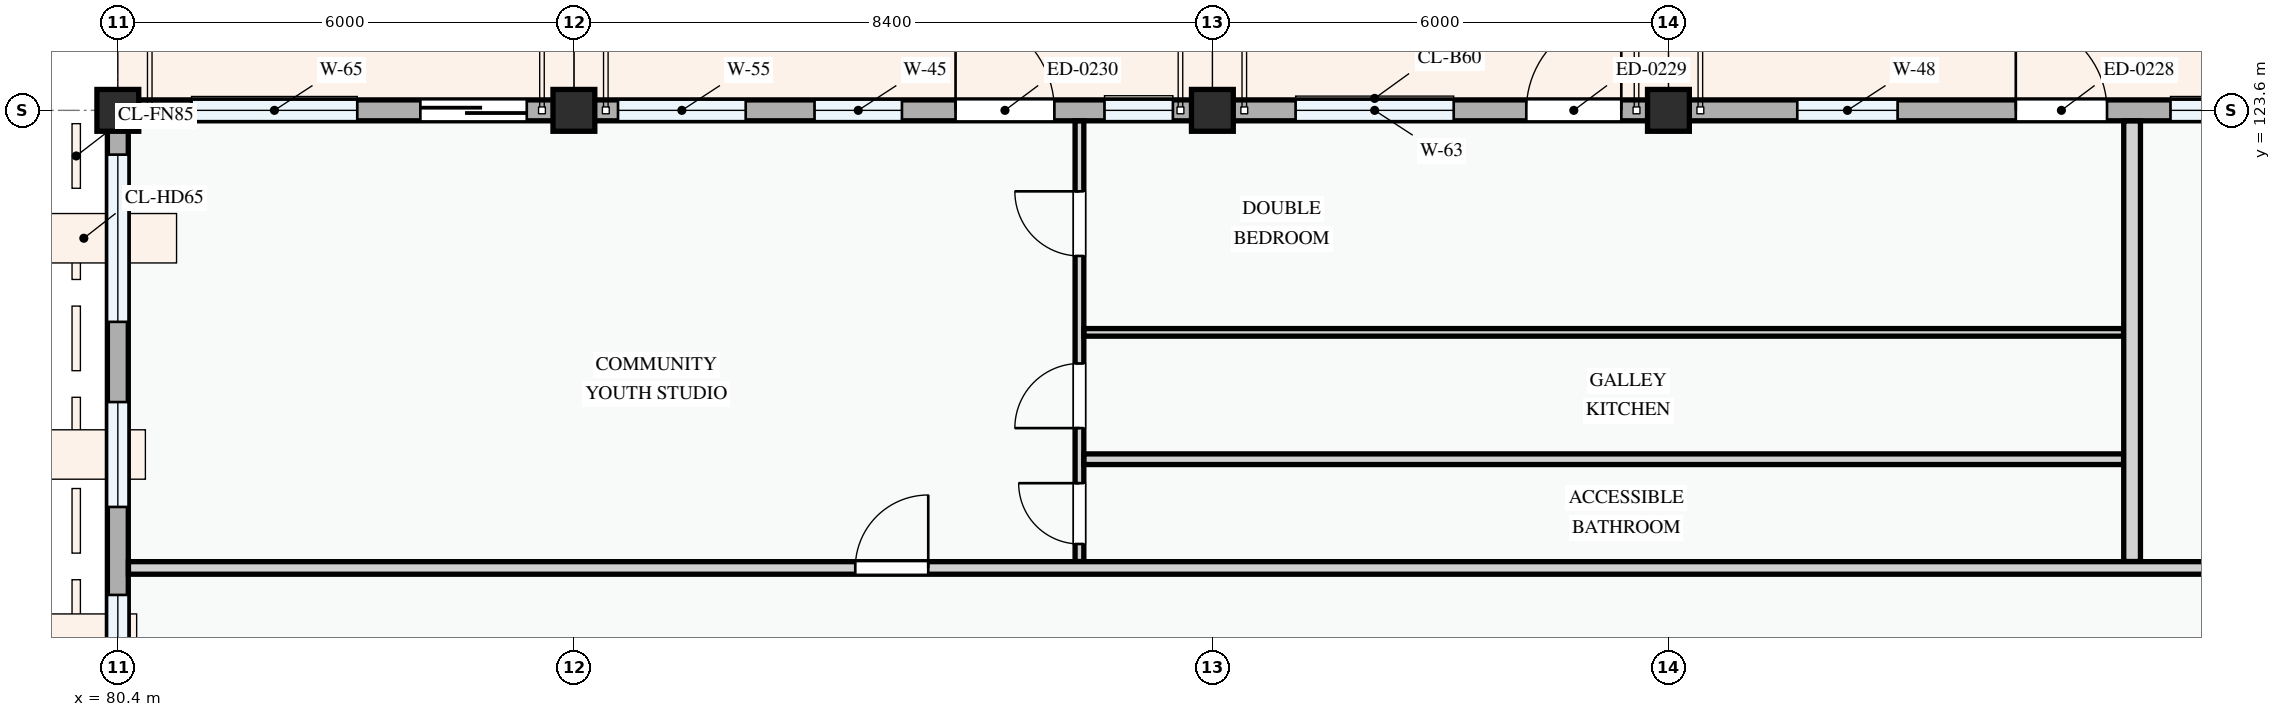
"""IFC4 building model, lengths in metres.
Left out: names, types, materials, properties, quantities, classifications, styles, units other than length and angle.
Written with IfcOpenShell. Run it as: python <this file> out.ifc"""

import sys

from ifc_helpers import new_model, si_unit, direction, frame, frame_2d, origin, origin_2d, place, context, subcontext, project, spatial, rectangle, extrude, element, fill, save


model = new_model("IFC4")
c1 = context("Model", 3, precision=1e-05, world=origin(), true_north=direction((0.0, 1.0)))
c2 = subcontext(c1, "Body", "Model", "MODEL_VIEW")
j1 = project(units=[si_unit("LENGTHUNIT", "METRE"), si_unit("PLANEANGLEUNIT", "RADIAN")], contexts=[c1])
p1 = place(None, origin())
s1 = spatial("IfcSite", under=j1, at=p1, CompositionType="ELEMENT")
p2 = place(p1, origin())
s2 = spatial("IfcBuilding", under=s1, at=p2, CompositionType="ELEMENT")
p3 = place(p2, frame((0.0, 0.0, 27.9)))
s3 = spatial("IfcBuildingStorey", under=s2, at=p3, CompositionType="ELEMENT", Elevation=27.9)
for number, where, z_axis, x_axis in (
    (1, (80.4, 123.6, 0.0), (0.0, 0.0, 1.0), (1.0, 0.0, 0.0)),
    (2, (86.4, 123.6, 0.0), (0.0, 0.0, 1.0), (1.0, 0.0, 0.0)),
    (3, (94.8, 123.6, 0.0), (0.0, 0.0, 1.0), (1.0, 0.0, 0.0)),
    (4, (100.8, 123.6, 0.0), (0.0, 0.0, 1.0), (1.0, 0.0, 0.0)),
):
    element("IfcColumn", number, at=place(p3, frame(where, z_axis=z_axis, x_axis=x_axis)), inside=s3, PredefinedType="COLUMN", context=c2, shape_type="SweptSolid", body=[
        extrude(rectangle(XDim=0.55, YDim=0.55, at=origin_2d()), origin(), (0.0, 0.0, 1.0), 3.3),
    ])
p4 = place(p3, frame((109.2, 123.6, 0.0), z_axis=(0.0, 0.0, 1.0), x_axis=(-1.0, 0.0, 0.0)))
e5 = element("IfcWall", 5, at=p4, inside=s3, PredefinedType="STANDARD", context=c2, shape_type="SweptSolid", body=[
    extrude(rectangle(XDim=8.4, YDim=0.275, at=frame_2d((4.2, 0.0))), origin(), (0.0, 0.0, 1.0), 2.345),
])
p5 = place(p4, frame((2.63, 0.0, 0.0)))
e6 = element("IfcOpeningElement", 6, at=p5, cuts=e5, PredefinedType="OPENING", context=c2, shape_type="SweptSolid", body=[
    extrude(rectangle(XDim=1.2, YDim=2.15, at=frame_2d((0.6, 1.075))), frame((0.0, 0.147, 0.0), z_axis=(0.0, -1.0, 0.0), x_axis=(1.0, 0.0, 0.0)), (0.0, 0.0, 1.0), 0.295),
])
p6 = place(p4, frame((0.695, 0.0, 0.78)))
e7 = element("IfcOpeningElement", 7, at=p6, cuts=e5, PredefinedType="OPENING", context=c2, shape_type="SweptSolid", body=[
    extrude(rectangle(XDim=1.1, YDim=1.3, at=frame_2d((0.55, 0.65))), frame((0.0, 0.147, 0.0), z_axis=(0.0, -1.0, 0.0), x_axis=(1.0, 0.0, 0.0)), (0.0, 0.0, 1.0), 0.295),
])
p7 = place(p4, frame((5.385, 0.0, 0.78)))
e8 = element("IfcOpeningElement", 8, at=p7, cuts=e5, PredefinedType="OPENING", context=c2, shape_type="SweptSolid", body=[
    extrude(rectangle(XDim=1.32, YDim=1.35, at=frame_2d((0.66, 0.675))), frame((0.0, 0.147, 0.0), z_axis=(0.0, -1.0, 0.0), x_axis=(1.0, 0.0, 0.0)), (0.0, 0.0, 1.0), 0.295),
])
p8 = place(p3, frame((100.8, 123.6, 0.0), z_axis=(0.0, 0.0, 1.0), x_axis=(-1.0, 0.0, 0.0)))
e9 = element("IfcWall", 9, at=p8, inside=s3, PredefinedType="STANDARD", context=c2, shape_type="SweptSolid", body=[
    extrude(rectangle(XDim=6.0, YDim=0.275, at=frame_2d((3.0, 0.0))), origin(), (0.0, 0.0, 1.0), 2.445),
])
p9 = place(p8, frame((0.62, 0.0, 0.0)))
e10 = element("IfcOpeningElement", 10, at=p9, cuts=e9, PredefinedType="OPENING", context=c2, shape_type="SweptSolid", body=[
    extrude(rectangle(XDim=1.25, YDim=2.2, at=frame_2d((0.625, 1.1))), frame((0.0, 0.147, 0.0), z_axis=(0.0, -1.0, 0.0), x_axis=(1.0, 0.0, 0.0)), (0.0, 0.0, 1.0), 0.295),
])
p10 = place(p8, frame((2.825, 0.0, 0.78)))
e11 = element("IfcOpeningElement", 11, at=p10, cuts=e9, PredefinedType="OPENING", context=c2, shape_type="SweptSolid", body=[
    extrude(rectangle(XDim=2.08, YDim=1.52, at=frame_2d((1.04, 0.76))), frame((0.0, 0.147, 0.0), z_axis=(0.0, -1.0, 0.0), x_axis=(1.0, 0.0, 0.0)), (0.0, 0.0, 1.0), 0.295),
])
p11 = place(p3, frame((94.8, 123.6, 0.0), z_axis=(0.0, 0.0, 1.0), x_axis=(-1.0, 0.0, 0.0)))
e12 = element("IfcWall", 12, at=p11, inside=s3, PredefinedType="STANDARD", context=c2, shape_type="SweptSolid", body=[
    extrude(rectangle(XDim=8.4, YDim=0.275, at=frame_2d((4.2, 0.0))), origin(), (0.0, 0.0, 1.0), 2.345),
])
p12 = place(p11, frame((2.079, 0.0, 0.0)))
e13 = element("IfcOpeningElement", 13, at=p12, cuts=e12, PredefinedType="OPENING", context=c2, shape_type="SweptSolid", body=[
    extrude(rectangle(XDim=1.3, YDim=2.15, at=frame_2d((0.65, 1.075))), frame((0.0, 0.147, 0.0), z_axis=(0.0, -1.0, 0.0), x_axis=(1.0, 0.0, 0.0)), (0.0, 0.0, 1.0), 0.295),
])
p13 = place(p11, frame((0.519, 0.0, 0.78)))
e14 = element("IfcOpeningElement", 14, at=p13, cuts=e12, PredefinedType="OPENING", context=c2, shape_type="SweptSolid", body=[
    extrude(rectangle(XDim=0.9, YDim=1.2, at=frame_2d((0.45, 0.6))), frame((0.0, 0.147, 0.0), z_axis=(0.0, -1.0, 0.0), x_axis=(1.0, 0.0, 0.0)), (0.0, 0.0, 1.0), 0.295),
])
p14 = place(p11, frame((4.084, 0.0, 0.78)))
e15 = element("IfcOpeningElement", 15, at=p14, cuts=e12, PredefinedType="OPENING", context=c2, shape_type="SweptSolid", body=[
    extrude(rectangle(XDim=1.15, YDim=1.25, at=frame_2d((0.575, 0.625))), frame((0.0, 0.147, 0.0), z_axis=(0.0, -1.0, 0.0), x_axis=(1.0, 0.0, 0.0)), (0.0, 0.0, 1.0), 0.295),
])
p15 = place(p11, frame((6.14, 0.0, 0.78)))
e16 = element("IfcOpeningElement", 16, at=p15, cuts=e12, PredefinedType="OPENING", context=c2, shape_type="SweptSolid", body=[
    extrude(rectangle(XDim=1.68, YDim=1.46, at=frame_2d((0.84, 0.73))), frame((0.0, 0.147, 0.0), z_axis=(0.0, -1.0, 0.0), x_axis=(1.0, 0.0, 0.0)), (0.0, 0.0, 1.0), 0.295),
])
p16 = place(p3, frame((86.4, 123.6, 0.0), z_axis=(0.0, 0.0, 1.0), x_axis=(-1.0, 0.0, 0.0)))
e17 = element("IfcWall", 17, at=p16, inside=s3, PredefinedType="STANDARD", context=c2, shape_type="SweptSolid", body=[
    extrude(rectangle(XDim=6.0, YDim=0.275, at=frame_2d((3.0, 0.0))), origin(), (0.0, 0.0, 1.0), 2.445),
])
p17 = place(p16, frame((0.62, 0.0, 0.0)))
e18 = element("IfcOpeningElement", 18, at=p17, cuts=e17, PredefinedType="OPENING", context=c2, shape_type="SweptSolid", body=[
    extrude(rectangle(XDim=1.4, YDim=2.2, at=frame_2d((0.7, 1.1))), frame((0.0, 0.147, 0.0), z_axis=(0.0, -1.0, 0.0), x_axis=(1.0, 0.0, 0.0)), (0.0, 0.0, 1.0), 0.295),
])
p18 = place(p16, frame((2.85, 0.0, 0.78)))
e19 = element("IfcOpeningElement", 19, at=p18, cuts=e17, PredefinedType="OPENING", context=c2, shape_type="SweptSolid", body=[
    extrude(rectangle(XDim=2.18, YDim=1.48, at=frame_2d((1.09, 0.74))), frame((0.0, 0.147, 0.0), z_axis=(0.0, -1.0, 0.0), x_axis=(1.0, 0.0, 0.0)), (0.0, 0.0, 1.0), 0.295),
])
p19 = place(p3, frame((80.4, 123.6, 0.0), z_axis=(0.0, 0.0, 1.0), x_axis=(0.0, -1.0, 0.0)))
e20 = element("IfcWall", 20, at=p19, inside=s3, PredefinedType="STANDARD", context=c2, shape_type="SweptSolid", body=[
    extrude(rectangle(XDim=8.4, YDim=0.275, at=frame_2d((4.2, 0.0))), origin(), (0.0, 0.0, 1.0), 2.425),
])
p20 = place(p19, frame((0.583, 0.0, 0.78)))
e21 = element("IfcOpeningElement", 21, at=p20, cuts=e20, PredefinedType="OPENING", context=c2, shape_type="SweptSolid", body=[
    extrude(rectangle(XDim=2.2, YDim=1.5, at=frame_2d((1.1, 0.75))), frame((0.0, 0.147, 0.0), z_axis=(0.0, -1.0, 0.0), x_axis=(1.0, 0.0, 0.0)), (0.0, 0.0, 1.0), 0.295),
])
p21 = place(p19, frame((3.837, 0.0, 0.78)))
e22 = element("IfcOpeningElement", 22, at=p21, cuts=e20, PredefinedType="OPENING", context=c2, shape_type="SweptSolid", body=[
    extrude(rectangle(XDim=1.38, YDim=1.48, at=frame_2d((0.69, 0.74))), frame((0.0, 0.147, 0.0), z_axis=(0.0, -1.0, 0.0), x_axis=(1.0, 0.0, 0.0)), (0.0, 0.0, 1.0), 0.295),
])
p22 = place(p19, frame((6.375, 0.0, 0.78)))
e23 = element("IfcOpeningElement", 23, at=p22, cuts=e20, PredefinedType="OPENING", context=c2, shape_type="SweptSolid", body=[
    extrude(rectangle(XDim=1.15, YDim=1.25, at=frame_2d((0.575, 0.625))), frame((0.0, 0.147, 0.0), z_axis=(0.0, -1.0, 0.0), x_axis=(1.0, 0.0, 0.0)), (0.0, 0.0, 1.0), 0.295),
])
p23 = place(p3, frame((93.051, 117.665, 0.0), z_axis=(0.0, 0.0, 1.0), x_axis=(0.0, 1.0, 0.0)))
e24 = element("IfcWall", 24, at=p23, inside=s3, PredefinedType="PARTITIONING", context=c2, shape_type="SweptSolid", body=[
    extrude(rectangle(XDim=5.796, YDim=0.115, at=frame_2d((2.898, 0.0))), origin(), (0.0, 0.0, 1.0), 3.0),
])
p24 = place(p23, frame((0.231, 0.0, 0.0)))
e25 = element("IfcOpeningElement", 25, at=p24, cuts=e24, PredefinedType="OPENING", context=c2, shape_type="SweptSolid", body=[
    extrude(rectangle(XDim=0.8, YDim=2.1, at=frame_2d((0.4, 1.05))), frame((0.0, 0.067, 0.0), z_axis=(0.0, -1.0, 0.0), x_axis=(1.0, 0.0, 0.0)), (0.0, 0.0, 1.0), 0.135),
])
p25 = place(p23, frame((1.755, 0.0, 0.0)))
e26 = element("IfcOpeningElement", 26, at=p25, cuts=e24, PredefinedType="OPENING", context=c2, shape_type="SweptSolid", body=[
    extrude(rectangle(XDim=0.85, YDim=2.1, at=frame_2d((0.425, 1.05))), frame((0.0, 0.067, 0.0), z_axis=(0.0, -1.0, 0.0), x_axis=(1.0, 0.0, 0.0)), (0.0, 0.0, 1.0), 0.135),
])
p26 = place(p23, frame((4.02, 0.0, 0.0)))
e27 = element("IfcOpeningElement", 27, at=p26, cuts=e24, PredefinedType="OPENING", context=c2, shape_type="SweptSolid", body=[
    extrude(rectangle(XDim=0.85, YDim=2.1, at=frame_2d((0.425, 1.05))), frame((0.0, 0.067, 0.0), z_axis=(0.0, -1.0, 0.0), x_axis=(1.0, 0.0, 0.0)), (0.0, 0.0, 1.0), 0.135),
])
p27 = place(p3, frame((93.111, 120.679, 0.0), z_axis=(0.0, 0.0, 1.0), x_axis=(1.0, 0.0, 0.0)))
e28 = element("IfcWall", 28, at=p27, inside=s3, PredefinedType="PARTITIONING", context=c2, shape_type="SweptSolid", body=[
    extrude(rectangle(XDim=13.677, YDim=0.1, at=frame_2d((6.839, 0.0))), origin(), (0.0, 0.0, 1.0), 3.0),
])
p28 = place(p3, frame((93.111, 119.01, 0.0), z_axis=(0.0, 0.0, 1.0), x_axis=(1.0, 0.0, 0.0)))
e29 = element("IfcWall", 29, at=p28, inside=s3, PredefinedType="PARTITIONING", context=c2, shape_type="SweptSolid", body=[
    extrude(rectangle(XDim=13.677, YDim=0.14, at=frame_2d((6.839, 0.0))), origin(), (0.0, 0.0, 1.0), 3.0),
])
p29 = place(p3, frame((106.9, 117.665, 0.0), z_axis=(0.0, 0.0, 1.0), x_axis=(0.0, 1.0, 0.0)))
e30 = element("IfcWall", 30, at=p29, inside=s3, PredefinedType="PARTITIONING", context=c2, shape_type="SweptSolid", body=[
    extrude(rectangle(XDim=5.796, YDim=0.22, at=frame_2d((2.898, 0.0))), origin(), (0.0, 0.0, 1.0), 3.0),
])
p30 = place(p3, frame((80.54, 117.58, 0.0), z_axis=(0.0, 0.0, 1.0), x_axis=(1.0, 0.0, 0.0)))
e31 = element("IfcWall", 31, at=p30, inside=s3, PredefinedType="PARTITIONING", context=c2, shape_type="SweptSolid", body=[
    extrude(rectangle(XDim=72.0, YDim=0.165, at=frame_2d((36.0, 0.0))), origin(), (0.0, 0.0, 1.0), 3.0),
])
p31 = place(p30, frame((9.562, 0.0, 0.0)))
e32 = element("IfcOpeningElement", 32, at=p31, cuts=e31, PredefinedType="OPENING", context=c2, shape_type="SweptSolid", body=[
    extrude(rectangle(XDim=0.96, YDim=2.12, at=frame_2d((0.48, 1.06))), frame((0.0, 0.093, 0.0), z_axis=(0.0, -1.0, 0.0), x_axis=(1.0, 0.0, 0.0)), (0.0, 0.0, 1.0), 0.185),
])
p32 = place(p30, frame((37.179, 0.0, 0.0)))
e33 = element("IfcOpeningElement", 33, at=p32, cuts=e31, PredefinedType="OPENING", context=c2, shape_type="SweptSolid", body=[
    extrude(rectangle(XDim=0.92, YDim=2.1, at=frame_2d((0.46, 1.05))), frame((0.0, 0.093, 0.0), z_axis=(0.0, -1.0, 0.0), x_axis=(1.0, 0.0, 0.0)), (0.0, 0.0, 1.0), 0.185),
])
p33 = place(p30, frame((52.799, 0.0, 0.0)))
e34 = element("IfcOpeningElement", 34, at=p33, cuts=e31, PredefinedType="OPENING", context=c2, shape_type="SweptSolid", body=[
    extrude(rectangle(XDim=0.92, YDim=2.1, at=frame_2d((0.46, 1.05))), frame((0.0, 0.093, 0.0), z_axis=(0.0, -1.0, 0.0), x_axis=(1.0, 0.0, 0.0)), (0.0, 0.0, 1.0), 0.185),
])
p34 = place(p5, frame((1.2, 0.0, 0.0), z_axis=(0.0, 0.0, 1.0), x_axis=(-1.0, 0.0, 0.0)))
e35 = element("IfcDoor", 35, at=p34, inside=s3, OperationType="SINGLE_SWING_LEFT", PredefinedType="DOOR", context=c2, shape_type="SweptSolid", body=[
    extrude(rectangle(XDim=1.2, YDim=2.15, at=frame_2d((0.6, 1.075))), frame((0.0, 0.025, 0.0), z_axis=(0.0, -1.0, 0.0), x_axis=(1.0, 0.0, 0.0)), (0.0, 0.0, 1.0), 0.05),
])
fill(e6, e35)
p35 = place(p6, origin())
e36 = element("IfcWindow", 36, at=p35, inside=s3, PartitioningType="SINGLE_PANEL", PredefinedType="WINDOW", context=c2, shape_type="SweptSolid", body=[
    extrude(rectangle(XDim=1.1, YDim=1.3, at=frame_2d((0.55, 0.65))), frame((0.0, 0.03, 0.0), z_axis=(0.0, -1.0, 0.0), x_axis=(1.0, 0.0, 0.0)), (0.0, 0.0, 1.0), 0.06),
])
fill(e7, e36)
p36 = place(p7, origin())
e37 = element("IfcWindow", 37, at=p36, inside=s3, PartitioningType="SINGLE_PANEL", PredefinedType="WINDOW", context=c2, shape_type="SweptSolid", body=[
    extrude(rectangle(XDim=1.32, YDim=1.35, at=frame_2d((0.66, 0.675))), frame((0.0, 0.03, 0.0), z_axis=(0.0, -1.0, 0.0), x_axis=(1.0, 0.0, 0.0)), (0.0, 0.0, 1.0), 0.06),
])
fill(e8, e37)
p37 = place(p9, frame((1.25, 0.0, 0.0), z_axis=(0.0, 0.0, 1.0), x_axis=(-1.0, 0.0, 0.0)))
e38 = element("IfcDoor", 38, at=p37, inside=s3, OperationType="SINGLE_SWING_RIGHT", PredefinedType="DOOR", context=c2, shape_type="SweptSolid", body=[
    extrude(rectangle(XDim=1.25, YDim=2.2, at=frame_2d((0.625, 1.1))), frame((0.0, 0.025, 0.0), z_axis=(0.0, -1.0, 0.0), x_axis=(1.0, 0.0, 0.0)), (0.0, 0.0, 1.0), 0.05),
])
fill(e10, e38)
p38 = place(p10, origin())
e39 = element("IfcWindow", 39, at=p38, inside=s3, PartitioningType="DOUBLE_PANEL_VERTICAL", PredefinedType="WINDOW", context=c2, shape_type="SweptSolid", body=[
    extrude(rectangle(XDim=2.08, YDim=1.52, at=frame_2d((1.04, 0.76))), frame((0.0, 0.03, 0.0), z_axis=(0.0, -1.0, 0.0), x_axis=(1.0, 0.0, 0.0)), (0.0, 0.0, 1.0), 0.06),
])
fill(e11, e39)
p39 = place(p12, frame((1.3, 0.0, 0.0), z_axis=(0.0, 0.0, 1.0), x_axis=(-1.0, 0.0, 0.0)))
e40 = element("IfcDoor", 40, at=p39, inside=s3, OperationType="SINGLE_SWING_LEFT", PredefinedType="DOOR", context=c2, shape_type="SweptSolid", body=[
    extrude(rectangle(XDim=1.3, YDim=2.15, at=frame_2d((0.65, 1.075))), frame((0.0, 0.025, 0.0), z_axis=(0.0, -1.0, 0.0), x_axis=(1.0, 0.0, 0.0)), (0.0, 0.0, 1.0), 0.05),
])
fill(e13, e40)
p40 = place(p13, origin())
e41 = element("IfcWindow", 41, at=p40, inside=s3, PartitioningType="SINGLE_PANEL", PredefinedType="WINDOW", context=c2, shape_type="SweptSolid", body=[
    extrude(rectangle(XDim=0.9, YDim=1.2, at=frame_2d((0.45, 0.6))), frame((0.0, 0.03, 0.0), z_axis=(0.0, -1.0, 0.0), x_axis=(1.0, 0.0, 0.0)), (0.0, 0.0, 1.0), 0.06),
])
fill(e14, e41)
p41 = place(p14, origin())
e42 = element("IfcWindow", 42, at=p41, inside=s3, PartitioningType="SINGLE_PANEL", PredefinedType="WINDOW", context=c2, shape_type="SweptSolid", body=[
    extrude(rectangle(XDim=1.15, YDim=1.25, at=frame_2d((0.575, 0.625))), frame((0.0, 0.03, 0.0), z_axis=(0.0, -1.0, 0.0), x_axis=(1.0, 0.0, 0.0)), (0.0, 0.0, 1.0), 0.06),
])
fill(e15, e42)
p42 = place(p15, origin())
e43 = element("IfcWindow", 43, at=p42, inside=s3, PartitioningType="DOUBLE_PANEL_VERTICAL", PredefinedType="WINDOW", context=c2, shape_type="SweptSolid", body=[
    extrude(rectangle(XDim=1.68, YDim=1.46, at=frame_2d((0.84, 0.73))), frame((0.0, 0.03, 0.0), z_axis=(0.0, -1.0, 0.0), x_axis=(1.0, 0.0, 0.0)), (0.0, 0.0, 1.0), 0.06),
])
fill(e16, e43)
p43 = place(p17, frame((1.4, 0.0, 0.0), z_axis=(0.0, 0.0, 1.0), x_axis=(-1.0, 0.0, 0.0)))
e44 = element("IfcDoor", 44, at=p43, inside=s3, OperationType="SLIDING_TO_LEFT", PredefinedType="DOOR", context=c2, shape_type="SweptSolid", body=[
    extrude(rectangle(XDim=1.4, YDim=2.2, at=frame_2d((0.7, 1.1))), frame((0.0, 0.025, 0.0), z_axis=(0.0, -1.0, 0.0), x_axis=(1.0, 0.0, 0.0)), (0.0, 0.0, 1.0), 0.05),
])
fill(e18, e44)
p44 = place(p18, origin())
e45 = element("IfcWindow", 45, at=p44, inside=s3, PartitioningType="DOUBLE_PANEL_VERTICAL", PredefinedType="WINDOW", context=c2, shape_type="SweptSolid", body=[
    extrude(rectangle(XDim=2.18, YDim=1.48, at=frame_2d((1.09, 0.74))), frame((0.0, 0.03, 0.0), z_axis=(0.0, -1.0, 0.0), x_axis=(1.0, 0.0, 0.0)), (0.0, 0.0, 1.0), 0.06),
])
fill(e19, e45)
p45 = place(p20, origin())
e46 = element("IfcWindow", 46, at=p45, inside=s3, PartitioningType="DOUBLE_PANEL_VERTICAL", PredefinedType="WINDOW", context=c2, shape_type="SweptSolid", body=[
    extrude(rectangle(XDim=2.2, YDim=1.5, at=frame_2d((1.1, 0.75))), frame((0.0, 0.03, 0.0), z_axis=(0.0, -1.0, 0.0), x_axis=(1.0, 0.0, 0.0)), (0.0, 0.0, 1.0), 0.06),
])
fill(e21, e46)
p46 = place(p21, origin())
e47 = element("IfcWindow", 47, at=p46, inside=s3, PartitioningType="SINGLE_PANEL", PredefinedType="WINDOW", context=c2, shape_type="SweptSolid", body=[
    extrude(rectangle(XDim=1.38, YDim=1.48, at=frame_2d((0.69, 0.74))), frame((0.0, 0.03, 0.0), z_axis=(0.0, -1.0, 0.0), x_axis=(1.0, 0.0, 0.0)), (0.0, 0.0, 1.0), 0.06),
])
fill(e22, e47)
p47 = place(p22, origin())
e48 = element("IfcWindow", 48, at=p47, inside=s3, PartitioningType="SINGLE_PANEL", PredefinedType="WINDOW", context=c2, shape_type="SweptSolid", body=[
    extrude(rectangle(XDim=1.15, YDim=1.25, at=frame_2d((0.575, 0.625))), frame((0.0, 0.03, 0.0), z_axis=(0.0, -1.0, 0.0), x_axis=(1.0, 0.0, 0.0)), (0.0, 0.0, 1.0), 0.06),
])
fill(e23, e48)
p48 = place(p24, origin())
e49 = element("IfcDoor", 49, at=p48, inside=s3, OperationType="SINGLE_SWING_RIGHT", PredefinedType="DOOR", context=c2, shape_type="SweptSolid", body=[
    extrude(rectangle(XDim=0.8, YDim=2.1, at=frame_2d((0.4, 1.05))), frame((0.0, 0.025, 0.0), z_axis=(0.0, -1.0, 0.0), x_axis=(1.0, 0.0, 0.0)), (0.0, 0.0, 1.0), 0.05),
])
fill(e25, e49)
p49 = place(p25, origin())
e50 = element("IfcDoor", 50, at=p49, inside=s3, OperationType="SINGLE_SWING_LEFT", PredefinedType="DOOR", context=c2, shape_type="SweptSolid", body=[
    extrude(rectangle(XDim=0.85, YDim=2.1, at=frame_2d((0.425, 1.05))), frame((0.0, 0.025, 0.0), z_axis=(0.0, -1.0, 0.0), x_axis=(1.0, 0.0, 0.0)), (0.0, 0.0, 1.0), 0.05),
])
fill(e26, e50)
p50 = place(p26, origin())
e51 = element("IfcDoor", 51, at=p50, inside=s3, OperationType="SINGLE_SWING_RIGHT", PredefinedType="DOOR", context=c2, shape_type="SweptSolid", body=[
    extrude(rectangle(XDim=0.85, YDim=2.1, at=frame_2d((0.425, 1.05))), frame((0.0, 0.025, 0.0), z_axis=(0.0, -1.0, 0.0), x_axis=(1.0, 0.0, 0.0)), (0.0, 0.0, 1.0), 0.05),
])
fill(e27, e51)
p51 = place(p31, origin())
e52 = element("IfcDoor", 52, at=p51, inside=s3, OperationType="SINGLE_SWING_RIGHT", PredefinedType="DOOR", context=c2, shape_type="SweptSolid", body=[
    extrude(rectangle(XDim=0.96, YDim=2.12, at=frame_2d((0.48, 1.06))), frame((0.0, 0.025, 0.0), z_axis=(0.0, -1.0, 0.0), x_axis=(1.0, 0.0, 0.0)), (0.0, 0.0, 1.0), 0.05),
])
fill(e32, e52)
save(model, sys.argv[1])
